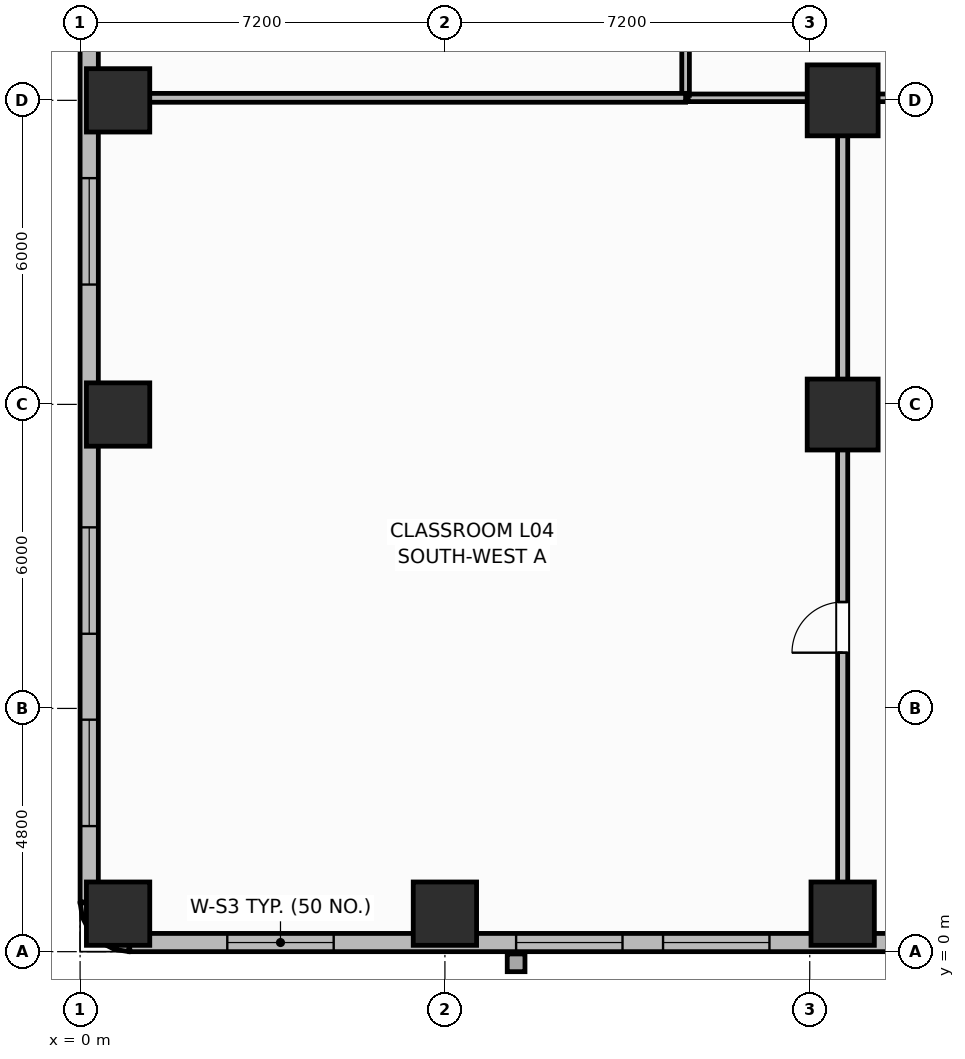
"""IFC4 building model, lengths in metres.
Left out: names, types, materials, properties, quantities, classifications, styles, units other than length and angle.
Written with IfcOpenShell. Run it as: python <this file> out.ifc"""

import sys

from ifc_helpers import new_model, si_unit, direction, frame, frame_2d, origin, origin_2d, place, context, subcontext, project, spatial, rectangle, extrude, element, fill, save


model = new_model("IFC4")
c1 = context("Model", 3, precision=1e-05, world=origin(), true_north=direction((0.0, 1.0)))
c2 = subcontext(c1, "Body", "Model", "MODEL_VIEW")
j1 = project(units=[si_unit("LENGTHUNIT", "METRE"), si_unit("PLANEANGLEUNIT", "RADIAN")], contexts=[c1])
p1 = place(None, origin())
s1 = spatial("IfcSite", under=j1, at=p1, CompositionType="ELEMENT")
p2 = place(p1, origin())
s2 = spatial("IfcBuilding", under=s1, at=p2, CompositionType="ELEMENT")
p3 = place(p2, frame((0.0, 0.0, 20.1)))
s3 = spatial("IfcBuildingStorey", under=s2, at=p3, CompositionType="ELEMENT", Elevation=20.1)
for number, where, z_axis, x_axis in (
    (1, (0.75, 0.75, 0.0), (0.0, 0.0, 1.0), (1.0, 0.0, 0.0)),
    (2, (0.75, 10.6, 0.0), (0.0, 0.0, 1.0), (1.0, 0.0, 0.0)),
    (3, (0.75, 16.8, 0.0), (0.0, 0.0, 1.0), (1.0, 0.0, 0.0)),
    (4, (7.2, 0.75, 0.0), (0.0, 0.0, 1.0), (1.0, 0.0, 0.0)),
    (5, (15.05, 0.75, 0.0), (0.0, 0.0, 1.0), (1.0, 0.0, 0.0)),
):
    element("IfcColumn", number, at=place(p3, frame(where, z_axis=z_axis, x_axis=x_axis)), inside=s3, PredefinedType="COLUMN", context=c2, shape_type="SweptSolid", body=[
        extrude(rectangle(XDim=1.25, YDim=1.25, at=origin_2d()), origin(), (0.0, 0.0, 1.0), 4.5),
    ])
for number, where, z_axis, x_axis in (
    (6, (15.05, 10.6, 0.0), (0.0, 0.0, 1.0), (1.0, 0.0, 0.0)),
    (7, (15.05, 16.8, 0.0), (0.0, 0.0, 1.0), (1.0, 0.0, 0.0)),
):
    element("IfcColumn", number, at=place(p3, frame(where, z_axis=z_axis, x_axis=x_axis)), inside=s3, PredefinedType="COLUMN", context=c2, shape_type="SweptSolid", body=[
        extrude(rectangle(XDim=1.4, YDim=1.4, at=origin_2d()), origin(), (0.0, 0.0, 1.0), 4.5),
    ])
for number, where, z_axis, x_axis in (
    (8, (0.18, 0.98, 0.0), (0.0, 0.0, 1.0), (0.157, -0.988, 0.0)),
    (9, (0.219, 0.733, 0.0), (0.0, 0.0, 1.0), (0.453, -0.891, 0.0)),
    (10, (0.333, 0.51, 0.0), (0.0, 0.0, 1.0), (0.707, -0.707, 0.0)),
    (11, (0.51, 0.333, 0.0), (0.0, 0.0, 1.0), (0.891, -0.453, 0.0)),
    (12, (0.733, 0.219, 0.0), (0.0, 0.0, 1.0), (0.988, -0.157, 0.0)),
):
    element("IfcWall", number, at=place(p3, frame(where, z_axis=z_axis, x_axis=x_axis)), inside=s3, PredefinedType="SOLIDWALL", context=c2, shape_type="SweptSolid", body=[
        extrude(rectangle(XDim=0.25, YDim=0.36, at=frame_2d((0.125, 0.0))), origin(), (0.0, 0.0, 1.0), 2.3),
    ])
p4 = place(p3, frame((0.98, 0.18, 0.0), z_axis=(0.0, 0.0, 1.0), x_axis=(1.0, 0.0, 0.0)))
e13 = element("IfcWall", 13, at=p4, inside=s3, PredefinedType="SOLIDWALL", context=c2, shape_type="SweptSolid", body=[
    extrude(rectangle(XDim=15.25, YDim=0.36, at=frame_2d((7.625, 0.0))), origin(), (0.0, 0.0, 1.0), 2.3),
])
p5 = place(p4, frame((1.925, 0.0, 0.3)))
e14 = element("IfcOpeningElement", 14, at=p5, cuts=e13, PredefinedType="OPENING", context=c2, shape_type="SweptSolid", body=[
    extrude(rectangle(XDim=2.1, YDim=2.2, at=frame_2d((1.05, 1.1))), frame((0.0, 0.19, 0.0), z_axis=(0.0, -1.0, 0.0), x_axis=(1.0, 0.0, 0.0)), (0.0, 0.0, 1.0), 0.38),
])
p6 = place(p4, frame((7.625, 0.0, 0.3)))
e15 = element("IfcOpeningElement", 15, at=p6, cuts=e13, PredefinedType="OPENING", context=c2, shape_type="SweptSolid", body=[
    extrude(rectangle(XDim=2.1, YDim=2.2, at=frame_2d((1.05, 1.1))), frame((0.0, 0.19, 0.0), z_axis=(0.0, -1.0, 0.0), x_axis=(1.0, 0.0, 0.0)), (0.0, 0.0, 1.0), 0.38),
])
p7 = place(p4, frame((10.525, 0.0, 0.3)))
e16 = element("IfcOpeningElement", 16, at=p7, cuts=e13, PredefinedType="OPENING", context=c2, shape_type="SweptSolid", body=[
    extrude(rectangle(XDim=2.1, YDim=2.2, at=frame_2d((1.05, 1.1))), frame((0.0, 0.19, 0.0), z_axis=(0.0, -1.0, 0.0), x_axis=(1.0, 0.0, 0.0)), (0.0, 0.0, 1.0), 0.38),
])
p8 = place(p3, frame((0.18, 55.42, 0.0), z_axis=(0.0, 0.0, 1.0), x_axis=(0.0, -1.0, 0.0)))
e17 = element("IfcWall", 17, at=p8, inside=s3, PredefinedType="SOLIDWALL", context=c2, shape_type="SweptSolid", body=[
    extrude(rectangle(XDim=54.44, YDim=0.36, at=frame_2d((27.22, 0.0))), origin(), (0.0, 0.0, 1.0), 2.3),
])
p9 = place(p8, frame((1.498, 0.0, 0.3)))
e18 = element("IfcOpeningElement", 18, at=p9, cuts=e17, PredefinedType="OPENING", context=c2, shape_type="SweptSolid", body=[
    extrude(rectangle(XDim=2.1, YDim=2.2, at=frame_2d((1.05, 1.1))), frame((0.0, 0.19, 0.0), z_axis=(0.0, -1.0, 0.0), x_axis=(1.0, 0.0, 0.0)), (0.0, 0.0, 1.0), 0.38),
])
p10 = place(p8, frame((5.294, 0.0, 0.3)))
e19 = element("IfcOpeningElement", 19, at=p10, cuts=e17, PredefinedType="OPENING", context=c2, shape_type="SweptSolid", body=[
    extrude(rectangle(XDim=2.1, YDim=2.2, at=frame_2d((1.05, 1.1))), frame((0.0, 0.19, 0.0), z_axis=(0.0, -1.0, 0.0), x_axis=(1.0, 0.0, 0.0)), (0.0, 0.0, 1.0), 0.38),
])
p11 = place(p8, frame((12.185, 0.0, 0.3)))
e20 = element("IfcOpeningElement", 20, at=p11, cuts=e17, PredefinedType="OPENING", context=c2, shape_type="SweptSolid", body=[
    extrude(rectangle(XDim=2.1, YDim=2.2, at=frame_2d((1.05, 1.1))), frame((0.0, 0.19, 0.0), z_axis=(0.0, -1.0, 0.0), x_axis=(1.0, 0.0, 0.0)), (0.0, 0.0, 1.0), 0.38),
])
p12 = place(p8, frame((17.031, 0.0, 0.3)))
e21 = element("IfcOpeningElement", 21, at=p12, cuts=e17, PredefinedType="OPENING", context=c2, shape_type="SweptSolid", body=[
    extrude(rectangle(XDim=2.1, YDim=2.2, at=frame_2d((1.05, 1.1))), frame((0.0, 0.19, 0.0), z_axis=(0.0, -1.0, 0.0), x_axis=(1.0, 0.0, 0.0)), (0.0, 0.0, 1.0), 0.38),
])
p13 = place(p8, frame((20.476, 0.0, 0.3)))
e22 = element("IfcOpeningElement", 22, at=p13, cuts=e17, PredefinedType="OPENING", context=c2, shape_type="SweptSolid", body=[
    extrude(rectangle(XDim=2.1, YDim=2.2, at=frame_2d((1.05, 1.1))), frame((0.0, 0.19, 0.0), z_axis=(0.0, -1.0, 0.0), x_axis=(1.0, 0.0, 0.0)), (0.0, 0.0, 1.0), 0.38),
])
p14 = place(p8, frame((23.572, 0.0, 0.3)))
e23 = element("IfcOpeningElement", 23, at=p14, cuts=e17, PredefinedType="OPENING", context=c2, shape_type="SweptSolid", body=[
    extrude(rectangle(XDim=2.1, YDim=2.2, at=frame_2d((1.05, 1.1))), frame((0.0, 0.19, 0.0), z_axis=(0.0, -1.0, 0.0), x_axis=(1.0, 0.0, 0.0)), (0.0, 0.0, 1.0), 0.38),
])
p15 = place(p8, frame((28.768, 0.0, 0.3)))
e24 = element("IfcOpeningElement", 24, at=p15, cuts=e17, PredefinedType="OPENING", context=c2, shape_type="SweptSolid", body=[
    extrude(rectangle(XDim=2.1, YDim=2.2, at=frame_2d((1.05, 1.1))), frame((0.0, 0.19, 0.0), z_axis=(0.0, -1.0, 0.0), x_axis=(1.0, 0.0, 0.0)), (0.0, 0.0, 1.0), 0.38),
])
p16 = place(p8, frame((31.864, 0.0, 0.3)))
e25 = element("IfcOpeningElement", 25, at=p16, cuts=e17, PredefinedType="OPENING", context=c2, shape_type="SweptSolid", body=[
    extrude(rectangle(XDim=2.1, YDim=2.2, at=frame_2d((1.05, 1.1))), frame((0.0, 0.19, 0.0), z_axis=(0.0, -1.0, 0.0), x_axis=(1.0, 0.0, 0.0)), (0.0, 0.0, 1.0), 0.38),
])
p17 = place(p8, frame((35.309, 0.0, 0.3)))
e26 = element("IfcOpeningElement", 26, at=p17, cuts=e17, PredefinedType="OPENING", context=c2, shape_type="SweptSolid", body=[
    extrude(rectangle(XDim=2.1, YDim=2.2, at=frame_2d((1.05, 1.1))), frame((0.0, 0.19, 0.0), z_axis=(0.0, -1.0, 0.0), x_axis=(1.0, 0.0, 0.0)), (0.0, 0.0, 1.0), 0.38),
])
p18 = place(p8, frame((40.155, 0.0, 0.3)))
e27 = element("IfcOpeningElement", 27, at=p18, cuts=e17, PredefinedType="OPENING", context=c2, shape_type="SweptSolid", body=[
    extrude(rectangle(XDim=2.1, YDim=2.2, at=frame_2d((1.05, 1.1))), frame((0.0, 0.19, 0.0), z_axis=(0.0, -1.0, 0.0), x_axis=(1.0, 0.0, 0.0)), (0.0, 0.0, 1.0), 0.38),
])
p19 = place(p8, frame((47.046, 0.0, 0.3)))
e28 = element("IfcOpeningElement", 28, at=p19, cuts=e17, PredefinedType="OPENING", context=c2, shape_type="SweptSolid", body=[
    extrude(rectangle(XDim=2.1, YDim=2.2, at=frame_2d((1.05, 1.1))), frame((0.0, 0.19, 0.0), z_axis=(0.0, -1.0, 0.0), x_axis=(1.0, 0.0, 0.0)), (0.0, 0.0, 1.0), 0.38),
])
p20 = place(p8, frame((50.842, 0.0, 0.3)))
e29 = element("IfcOpeningElement", 29, at=p20, cuts=e17, PredefinedType="OPENING", context=c2, shape_type="SweptSolid", body=[
    extrude(rectangle(XDim=2.1, YDim=2.2, at=frame_2d((1.05, 1.1))), frame((0.0, 0.19, 0.0), z_axis=(0.0, -1.0, 0.0), x_axis=(1.0, 0.0, 0.0)), (0.0, 0.0, 1.0), 0.38),
])
p21 = place(p3, frame((15.05, 0.4, 0.0), z_axis=(0.0, 0.0, 1.0), x_axis=(0.0, 1.0, 0.0)))
e30 = element("IfcWall", 30, at=p21, inside=s3, PredefinedType="PARTITIONING", context=c2, shape_type="SweptSolid", body=[
    extrude(rectangle(XDim=16.4, YDim=0.2, at=frame_2d((8.2, 0.0))), origin(), (0.0, 0.0, 1.0), 2.26),
])
p22 = place(p21, frame((5.5, 0.0, 0.0)))
e31 = element("IfcOpeningElement", 31, at=p22, cuts=e30, PredefinedType="OPENING", context=c2, shape_type="SweptSolid", body=[
    extrude(rectangle(XDim=1.0, YDim=2.15, at=frame_2d((0.5, 1.075))), frame((0.0, 0.11, 0.0), z_axis=(0.0, -1.0, 0.0), x_axis=(1.0, 0.0, 0.0)), (0.0, 0.0, 1.0), 0.22),
])
p23 = place(p3, frame((12.0, 16.85, 0.0), z_axis=(0.0, 0.0, 1.0), x_axis=(1.0, 0.0, 0.0)))
e32 = element("IfcWall", 32, at=p23, inside=s3, PredefinedType="PARTITIONING", context=c2, shape_type="SweptSolid", body=[
    extrude(rectangle(XDim=13.25, YDim=0.15, at=frame_2d((6.625, 0.0))), origin(), (0.0, 0.0, 1.0), 2.26),
])
p24 = place(p23, frame((7.5, 0.0, 0.0)))
e33 = element("IfcOpeningElement", 33, at=p24, cuts=e32, PredefinedType="OPENING", context=c2, shape_type="SweptSolid", body=[
    extrude(rectangle(XDim=1.0, YDim=2.15, at=frame_2d((0.5, 1.075))), frame((0.0, 0.085, 0.0), z_axis=(0.0, -1.0, 0.0), x_axis=(1.0, 0.0, 0.0)), (0.0, 0.0, 1.0), 0.17),
])
p25 = place(p3, frame((11.95, 16.9, 0.0), z_axis=(0.0, 0.0, 1.0), x_axis=(0.0, 1.0, 0.0)))
e34 = element("IfcWall", 34, at=p25, inside=s3, PredefinedType="PARTITIONING", context=c2, shape_type="SweptSolid", body=[
    extrude(rectangle(XDim=5.65, YDim=0.15, at=frame_2d((2.825, 0.0))), origin(), (0.0, 0.0, 1.0), 2.26),
])
p26 = place(p25, frame((2.1, 0.0, 0.0)))
e35 = element("IfcOpeningElement", 35, at=p26, cuts=e34, PredefinedType="OPENING", context=c2, shape_type="SweptSolid", body=[
    extrude(rectangle(XDim=0.95, YDim=2.1, at=frame_2d((0.475, 1.05))), frame((0.0, 0.085, 0.0), z_axis=(0.0, -1.0, 0.0), x_axis=(1.0, 0.0, 0.0)), (0.0, 0.0, 1.0), 0.17),
])
p27 = place(p3, frame((0.4, 16.85, 0.0), z_axis=(0.0, 0.0, 1.0), x_axis=(1.0, 0.0, 0.0)))
e36 = element("IfcWall", 36, at=p27, inside=s3, PredefinedType="PARTITIONING", context=c2, shape_type="SweptSolid", body=[
    extrude(rectangle(XDim=11.55, YDim=0.175, at=frame_2d((5.775, 0.0))), origin(), (0.0, 0.0, 1.0), 2.26),
])
p28 = place(p5, origin())
e37 = element("IfcWindow", 37, at=p28, inside=s3, PartitioningType="SINGLE_PANEL", PredefinedType="WINDOW", context=c2, shape_type="SweptSolid", body=[
    extrude(rectangle(XDim=2.1, YDim=2.2, at=frame_2d((1.05, 1.1))), frame((0.0, 0.03, 0.0), z_axis=(0.0, -1.0, 0.0), x_axis=(1.0, 0.0, 0.0)), (0.0, 0.0, 1.0), 0.06),
])
fill(e14, e37)
p29 = place(p6, origin())
e38 = element("IfcWindow", 38, at=p29, inside=s3, PartitioningType="SINGLE_PANEL", PredefinedType="WINDOW", context=c2, shape_type="SweptSolid", body=[
    extrude(rectangle(XDim=2.1, YDim=2.2, at=frame_2d((1.05, 1.1))), frame((0.0, 0.03, 0.0), z_axis=(0.0, -1.0, 0.0), x_axis=(1.0, 0.0, 0.0)), (0.0, 0.0, 1.0), 0.06),
])
fill(e15, e38)
p30 = place(p7, origin())
e39 = element("IfcWindow", 39, at=p30, inside=s3, PartitioningType="SINGLE_PANEL", PredefinedType="WINDOW", context=c2, shape_type="SweptSolid", body=[
    extrude(rectangle(XDim=2.1, YDim=2.2, at=frame_2d((1.05, 1.1))), frame((0.0, 0.03, 0.0), z_axis=(0.0, -1.0, 0.0), x_axis=(1.0, 0.0, 0.0)), (0.0, 0.0, 1.0), 0.06),
])
fill(e16, e39)
p31 = place(p18, origin())
e40 = element("IfcWindow", 40, at=p31, inside=s3, PartitioningType="SINGLE_PANEL", PredefinedType="WINDOW", context=c2, shape_type="SweptSolid", body=[
    extrude(rectangle(XDim=2.1, YDim=2.2, at=frame_2d((1.05, 1.1))), frame((0.0, 0.03, 0.0), z_axis=(0.0, -1.0, 0.0), x_axis=(1.0, 0.0, 0.0)), (0.0, 0.0, 1.0), 0.06),
])
fill(e27, e40)
p32 = place(p19, origin())
e41 = element("IfcWindow", 41, at=p32, inside=s3, PartitioningType="SINGLE_PANEL", PredefinedType="WINDOW", context=c2, shape_type="SweptSolid", body=[
    extrude(rectangle(XDim=2.1, YDim=2.2, at=frame_2d((1.05, 1.1))), frame((0.0, 0.03, 0.0), z_axis=(0.0, -1.0, 0.0), x_axis=(1.0, 0.0, 0.0)), (0.0, 0.0, 1.0), 0.06),
])
fill(e28, e41)
p33 = place(p20, origin())
e42 = element("IfcWindow", 42, at=p33, inside=s3, PartitioningType="SINGLE_PANEL", PredefinedType="WINDOW", context=c2, shape_type="SweptSolid", body=[
    extrude(rectangle(XDim=2.1, YDim=2.2, at=frame_2d((1.05, 1.1))), frame((0.0, 0.03, 0.0), z_axis=(0.0, -1.0, 0.0), x_axis=(1.0, 0.0, 0.0)), (0.0, 0.0, 1.0), 0.06),
])
fill(e29, e42)
p34 = place(p22, origin())
e43 = element("IfcDoor", 43, at=p34, inside=s3, OperationType="SINGLE_SWING_LEFT", PredefinedType="DOOR", context=c2, shape_type="SweptSolid", body=[
    extrude(rectangle(XDim=1.0, YDim=2.15, at=frame_2d((0.5, 1.075))), frame((0.0, 0.025, 0.0), z_axis=(0.0, -1.0, 0.0), x_axis=(1.0, 0.0, 0.0)), (0.0, 0.0, 1.0), 0.05),
])
fill(e31, e43)
save(model, sys.argv[1])
